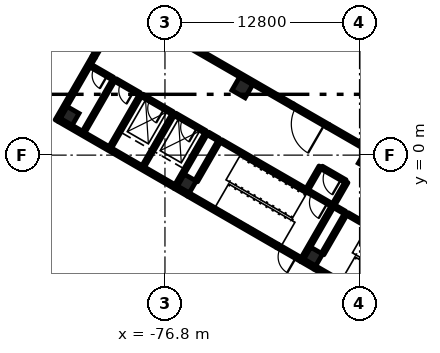
"""IFC4 building model, lengths in metres.
Left out: names, types, materials, properties, quantities, classifications, styles, units other than length and angle.
Written with IfcOpenShell. Run it as: python <this file> out.ifc"""

import sys

from ifc_helpers import new_model, si_unit, direction, frame, frame_2d, origin, origin_2d, place, context, subcontext, project, spatial, rectangle, extrude, element, fill, save


model = new_model("IFC4")
c1 = context("Model", 3, precision=1e-05, world=origin(), true_north=direction((0.0, 1.0)))
c2 = subcontext(c1, "Body", "Model", "MODEL_VIEW")
j1 = project(units=[si_unit("LENGTHUNIT", "METRE"), si_unit("PLANEANGLEUNIT", "RADIAN")], contexts=[c1])
p1 = place(None, origin())
s1 = spatial("IfcSite", under=j1, at=p1, CompositionType="ELEMENT")
p2 = place(p1, origin())
s2 = spatial("IfcBuilding", under=s1, at=p2, CompositionType="ELEMENT")
p3 = place(p2, origin())
s3 = spatial("IfcBuildingStorey", under=s2, at=p3, CompositionType="ELEMENT", Elevation=0.0)
for number, where, z_axis, x_axis in (
    (1, (-63.396, -0.349, -0.3), (0.0, 0.0, 1.0), (-0.5, -0.866, 0.0)),
    (2, (-71.71, 4.451, -0.3), (0.0, 0.0, 1.0), (-0.5, -0.866, 0.0)),
):
    element("IfcColumn", number, at=place(p3, frame(where, z_axis=z_axis, x_axis=x_axis)), inside=s3, PredefinedType="COLUMN", context=c2, shape_type="SweptSolid", body=[
        extrude(rectangle(XDim=1.0, YDim=1.0, at=origin_2d()), origin(), (0.0, 0.0, 1.0), 6.3),
    ])
for number, where, z_axis, x_axis in (
    (3, (-67.046, -6.671, -0.3), (0.0, 0.0, 1.0), (-0.5, -0.866, 0.0)),
    (4, (-75.36, -1.871, -0.3), (0.0, 0.0, 1.0), (-0.5, -0.866, 0.0)),
    (5, (-83.067, 2.579, -0.3), (0.0, 0.0, 1.0), (-0.5, -0.866, 0.0)),
):
    element("IfcColumn", number, at=place(p3, frame(where, z_axis=z_axis, x_axis=x_axis)), inside=s3, PredefinedType="COLUMN", context=c2, shape_type="SweptSolid", body=[
        extrude(rectangle(XDim=0.9, YDim=0.9, at=origin_2d()), origin(), (0.0, 0.0, 1.0), 6.3),
    ])
for number, where, z_axis, x_axis in (
    (6, (-73.919, 1.425, -1.5), (0.0, 0.0, 1.0), (-0.866, 0.5, 0.0)),
    (7, (-75.394, -1.129, -1.5), (0.0, 0.0, 1.0), (-0.866, 0.5, 0.0)),
):
    element("IfcWall", number, at=place(p3, frame(where, z_axis=z_axis, x_axis=x_axis)), inside=s3, PredefinedType="SOLIDWALL", context=c2, shape_type="SweptSolid", body=[
        extrude(rectangle(XDim=5.3, YDim=0.25, at=frame_2d((2.65, 0.0))), origin(), (0.0, 0.0, 1.0), 1.2),
    ])
p4 = place(p3, frame((-74.089, 1.379, -1.5), z_axis=(0.0, 0.0, 1.0), x_axis=(-0.499980770555, -0.866036505625, 0.0)))
e8 = element("IfcWall", 8, at=p4, inside=s3, PredefinedType="SOLIDWALL", context=c2, shape_type="SweptSolid", body=[
    extrude(rectangle(XDim=2.7, YDim=0.25, at=frame_2d((1.35, 0.0))), origin(), (0.0, 0.0, 1.0), 1.2),
])
p5 = place(p3, frame((-78.463, 3.905, -1.5), z_axis=(0.0, 0.0, 1.0), x_axis=(-0.4999416173, -0.866059108428, 0.0)))
e9 = element("IfcWall", 9, at=p5, inside=s3, PredefinedType="SOLIDWALL", context=c2, shape_type="SweptSolid", body=[
    extrude(rectangle(XDim=2.7, YDim=0.25, at=frame_2d((1.35, 0.0))), origin(), (0.0, 0.0, 1.0), 1.2),
])
p6 = place(p3, frame((-81.49, 6.461, 0.0), z_axis=(0.0, 0.0, 1.0), x_axis=(0.499998129301, 0.86602648383, 0.0)))
e10 = element("IfcWall", 10, at=p6, inside=s3, PredefinedType="SOLIDWALL", context=c2, shape_type="SweptSolid", body=[
    extrude(rectangle(XDim=2.3, YDim=0.25, at=frame_2d((1.15, 0.0))), origin(), (0.0, 0.0, 1.0), 5.7),
])
p7 = place(p6, frame((0.25, 0.0, 0.0)))
e11 = element("IfcOpeningElement", 11, at=p7, cuts=e10, PredefinedType="OPENING", context=c2, shape_type="SweptSolid", body=[
    extrude(rectangle(XDim=1.8, YDim=2.1, at=frame_2d((0.9, 1.05))), frame((0.0, 0.135, 0.0), z_axis=(0.0, -1.0, 0.0), x_axis=(1.0, 0.0, 0.0)), (0.0, 0.0, 1.0), 0.27),
])
p8 = place(p3, frame((-83.915, 2.26, 0.0), z_axis=(0.0, 0.0, 1.0), x_axis=(0.500010041276, 0.866019606374, 0.0)))
e12 = element("IfcWall", 12, at=p8, inside=s3, PredefinedType="SOLIDWALL", context=c2, shape_type="SweptSolid", body=[
    extrude(rectangle(XDim=4.85, YDim=0.25, at=frame_2d((2.425, 0.0))), origin(), (0.0, 0.0, 1.0), 5.7),
])
p9 = place(p3, frame((-61.098, -10.769, 0.0), z_axis=(0.0, 0.0, 1.0), x_axis=(-0.866026575979, 0.499997969693, 0.0)))
e13 = element("IfcWall", 13, at=p9, inside=s3, PredefinedType="SOLIDWALL", context=c2, shape_type="SweptSolid", body=[
    extrude(rectangle(XDim=6.75, YDim=0.25, at=frame_2d((3.375, 0.0))), origin(), (0.0, 0.0, 1.0), 5.7),
])
p10 = place(p3, frame((-67.81, -6.894, 0.0), z_axis=(0.0, 0.0, 1.0), x_axis=(-0.866033964044, 0.499985172903, 0.0)))
e14 = element("IfcWall", 14, at=p10, inside=s3, PredefinedType="SOLIDWALL", context=c2, shape_type="SweptSolid", body=[
    extrude(rectangle(XDim=1.85, YDim=0.25, at=frame_2d((0.925, 0.0))), origin(), (0.0, 0.0, 1.0), 5.7),
])
p11 = place(p10, frame((0.4, 0.0, 0.0)))
e15 = element("IfcOpeningElement", 15, at=p11, cuts=e14, PredefinedType="OPENING", context=c2, shape_type="SweptSolid", body=[
    extrude(rectangle(XDim=1.2, YDim=2.1, at=frame_2d((0.6, 1.05))), frame((0.0, 0.135, 0.0), z_axis=(0.0, -1.0, 0.0), x_axis=(1.0, 0.0, 0.0)), (0.0, 0.0, 1.0), 0.27),
])
p12 = place(p3, frame((-69.412, -5.969, 0.0), z_axis=(0.0, 0.0, 1.0), x_axis=(-0.866026575979, 0.499997969693, 0.0)))
e16 = element("IfcWall", 16, at=p12, inside=s3, PredefinedType="SOLIDWALL", context=c2, shape_type="SweptSolid", body=[
    extrude(rectangle(XDim=6.75, YDim=0.25, at=frame_2d((3.375, 0.0))), origin(), (0.0, 0.0, 1.0), 5.7),
])
p13 = place(p3, frame((-76.124, -2.094, 0.0), z_axis=(0.0, 0.0, 1.0), x_axis=(-0.866025267465, 0.500000236112, 0.0)))
e17 = element("IfcWall", 17, at=p13, inside=s3, PredefinedType="SOLIDWALL", context=c2, shape_type="SweptSolid", body=[
    extrude(rectangle(XDim=8.8, YDim=0.25, at=frame_2d((4.4, 0.0))), origin(), (0.0, 0.0, 1.0), 5.7),
])
for number, where, z_axis, x_axis in (
    (18, (-66.944, -7.394, 0.0), (0.0, 0.0, 1.0), (-0.866, 0.5, 0.0)),
    (19, (-75.258, -2.594, 0.0), (0.0, 0.0, 1.0), (-0.866, 0.5, 0.0)),
):
    element("IfcWall", number, at=place(p3, frame(where, z_axis=z_axis, x_axis=x_axis)), inside=s3, PredefinedType="SOLIDWALL", context=c2, shape_type="SweptSolid", body=[
        extrude(rectangle(XDim=1.0, YDim=0.25, at=frame_2d((0.5, 0.0))), origin(), (0.0, 0.0, 1.0), 5.7),
    ])
p14 = place(p3, frame((-64.881, -3.821, 0.0), z_axis=(0.0, 0.0, 1.0), x_axis=(-0.49999285859, -0.86602952684, 0.0)))
e20 = element("IfcWall", 20, at=p14, inside=s3, PredefinedType="SOLIDWALL", context=c2, shape_type="SweptSolid", body=[
    extrude(rectangle(XDim=3.1, YDim=0.2, at=frame_2d((1.55, 0.0))), origin(), (0.0, 0.0, 1.0), 5.7),
])
p15 = place(p3, frame((-65.747, -3.321, 0.0), z_axis=(0.0, 0.0, 1.0), x_axis=(-0.49999894854, -0.866026010844, 0.0)))
e21 = element("IfcWall", 21, at=p15, inside=s3, PredefinedType="SOLIDWALL", context=c2, shape_type="SweptSolid", body=[
    extrude(rectangle(XDim=4.0, YDim=0.2, at=frame_2d((2.0, 0.0))), origin(), (0.0, 0.0, 1.0), 5.7),
])
p16 = place(p3, frame((-73.195, 0.979, 0.0), z_axis=(0.0, 0.0, 1.0), x_axis=(-0.500026960575, -0.86600983753, 0.0)))
e22 = element("IfcWall", 22, at=p16, inside=s3, PredefinedType="SOLIDWALL", context=c2, shape_type="SweptSolid", body=[
    extrude(rectangle(XDim=3.1, YDim=0.2, at=frame_2d((1.55, 0.0))), origin(), (0.0, 0.0, 1.0), 5.7),
])
p17 = place(p3, frame((-59.035, -7.196, 0.0), z_axis=(0.0, 0.0, 1.0), x_axis=(-0.866027239912, 0.49999681972, 0.0)))
e23 = element("IfcWall", 23, at=p17, inside=s3, PredefinedType="SOLIDWALL", context=c2, shape_type="SweptSolid", body=[
    extrude(rectangle(XDim=6.65, YDim=0.2, at=frame_2d((3.325, 0.0))), origin(), (0.0, 0.0, 1.0), 5.7),
])
p18 = place(p3, frame((-65.834, -3.271, 0.0), z_axis=(0.0, 0.0, 1.0), x_axis=(-0.866036909293, 0.499980071345, 0.0)))
e24 = element("IfcWall", 24, at=p18, inside=s3, PredefinedType="SOLIDWALL", context=c2, shape_type="SweptSolid", body=[
    extrude(rectangle(XDim=1.75, YDim=0.2, at=frame_2d((0.875, 0.0))), origin(), (0.0, 0.0, 1.0), 5.7),
])
p19 = place(p18, frame((0.3, 0.0, 0.0)))
e25 = element("IfcOpeningElement", 25, at=p19, cuts=e24, PredefinedType="OPENING", context=c2, shape_type="SweptSolid", body=[
    extrude(rectangle(XDim=1.2, YDim=2.1, at=frame_2d((0.6, 1.05))), frame((0.0, 0.11, 0.0), z_axis=(0.0, -1.0, 0.0), x_axis=(1.0, 0.0, 0.0)), (0.0, 0.0, 1.0), 0.22),
])
p20 = place(p3, frame((-67.349, -2.396, 0.0), z_axis=(0.0, 0.0, 1.0), x_axis=(-0.86601134256, 0.500024353964, 0.0)))
e26 = element("IfcWall", 26, at=p20, inside=s3, PredefinedType="SOLIDWALL", context=c2, shape_type="SweptSolid", body=[
    extrude(rectangle(XDim=6.65, YDim=0.2, at=frame_2d((3.325, 0.0))), origin(), (0.0, 0.0, 1.0), 5.7),
])
for number, where, z_axis, x_axis in (
    (27, (-74.061, 1.479, 0.0), (0.0, 0.0, 1.0), (-0.5, -0.866, 0.0)),
    (28, (-76.226, 2.729, 0.0), (0.0, 0.0, 1.0), (-0.5, -0.866, 0.0)),
    (29, (-78.391, 3.979, 0.0), (0.0, 0.0, 1.0), (-0.5, -0.866, 0.0)),
):
    element("IfcWall", number, at=place(p3, frame(where, z_axis=z_axis, x_axis=x_axis)), inside=s3, PredefinedType="SOLIDWALL", context=c2, shape_type="SweptSolid", body=[
        extrude(rectangle(XDim=4.0, YDim=0.2, at=frame_2d((2.0, 0.0))), origin(), (0.0, 0.0, 1.0), 5.7),
    ])
p21 = place(p3, frame((-74.148, 1.529, 0.0), z_axis=(0.0, 0.0, 1.0), x_axis=(-0.865980515519, 0.500077740698, 0.0)))
e30 = element("IfcWall", 30, at=p21, inside=s3, PredefinedType="SOLIDWALL", context=c2, shape_type="SweptSolid", body=[
    extrude(rectangle(XDim=2.3, YDim=0.2, at=frame_2d((1.15, 0.0))), origin(), (0.0, 0.0, 1.0), 5.7),
])
p22 = place(p21, frame((0.6, 0.0, 0.0)))
e31 = element("IfcOpeningElement", 31, at=p22, cuts=e30, PredefinedType="OPENING", context=c2, shape_type="SweptSolid", body=[
    extrude(rectangle(XDim=1.1, YDim=2.1, at=frame_2d((0.55, 1.05))), frame((0.0, 0.11, 0.0), z_axis=(0.0, -1.0, 0.0), x_axis=(1.0, 0.0, 0.0)), (0.0, 0.0, 1.0), 0.22),
])
p23 = place(p3, frame((-76.313, 2.779, 0.0), z_axis=(0.0, 0.0, 1.0), x_axis=(-0.865980515519, 0.500077740698, 0.0)))
e32 = element("IfcWall", 32, at=p23, inside=s3, PredefinedType="SOLIDWALL", context=c2, shape_type="SweptSolid", body=[
    extrude(rectangle(XDim=2.3, YDim=0.2, at=frame_2d((1.15, 0.0))), origin(), (0.0, 0.0, 1.0), 5.7),
])
p24 = place(p23, frame((0.6, 0.0, 0.0)))
e33 = element("IfcOpeningElement", 33, at=p24, cuts=e32, PredefinedType="OPENING", context=c2, shape_type="SweptSolid", body=[
    extrude(rectangle(XDim=1.1, YDim=2.1, at=frame_2d((0.55, 1.05))), frame((0.0, 0.11, 0.0), z_axis=(0.0, -1.0, 0.0), x_axis=(1.0, 0.0, 0.0)), (0.0, 0.0, 1.0), 0.22),
])
for number, where, z_axis, x_axis in (
    (34, (-64.847, -1.763, 0.0), (0.0, 0.0, 1.0), (-0.5, -0.866, 0.0)),
    (35, (-66.579, -0.763, 0.0), (0.0, 0.0, 1.0), (-0.5, -0.866, 0.0)),
):
    element("IfcWall", number, at=place(p3, frame(where, z_axis=z_axis, x_axis=x_axis)), inside=s3, PredefinedType="PARTITIONING", context=c2, shape_type="SweptSolid", body=[
        extrude(rectangle(XDim=1.7, YDim=0.2, at=frame_2d((0.85, 0.0))), origin(), (0.0, 0.0, 1.0), 5.1),
    ])
p25 = place(p3, frame((-64.934, -1.713, 0.0), z_axis=(0.0, 0.0, 1.0), x_axis=(-0.866022985545, 0.500004188491, 0.0)))
e36 = element("IfcWall", 36, at=p25, inside=s3, PredefinedType="PARTITIONING", context=c2, shape_type="SweptSolid", body=[
    extrude(rectangle(XDim=1.8, YDim=0.2, at=frame_2d((0.9, 0.0))), origin(), (0.0, 0.0, 1.0), 5.1),
])
p26 = place(p25, frame((0.3, 0.0, 0.0)))
e37 = element("IfcOpeningElement", 37, at=p26, cuts=e36, PredefinedType="OPENING", context=c2, shape_type="SweptSolid", body=[
    extrude(rectangle(XDim=1.2, YDim=2.1, at=frame_2d((0.6, 1.05))), frame((0.0, 0.11, 0.0), z_axis=(0.0, -1.0, 0.0), x_axis=(1.0, 0.0, 0.0)), (0.0, 0.0, 1.0), 0.22),
])
p27 = place(p3, frame((-60.095, -1.533, 0.0), z_axis=(0.0, 0.0, 1.0), x_axis=(-0.866013532718, 0.500020560727, 0.0)))
e38 = element("IfcWall", 38, at=p27, inside=s3, PredefinedType="SOLIDWALL", context=c2, shape_type="SweptSolid", body=[
    extrude(rectangle(XDim=6.9, YDim=0.25, at=frame_2d((3.45, 0.0))), origin(), (0.0, 0.0, 1.0), 5.1),
])
p28 = place(p3, frame((-66.071, 1.917, 0.0), z_axis=(0.0, 0.0, 1.0), x_axis=(-0.866059108428, 0.4999416173, 0.0)))
e39 = element("IfcWall", 39, at=p28, inside=s3, PredefinedType="SOLIDWALL", context=c2, shape_type="SweptSolid", body=[
    extrude(rectangle(XDim=2.7, YDim=0.25, at=frame_2d((1.35, 0.0))), origin(), (0.0, 0.0, 1.0), 5.1),
])
p29 = place(p28, frame((0.25, 0.0, 0.0)))
e40 = element("IfcOpeningElement", 40, at=p29, cuts=e39, PredefinedType="OPENING", context=c2, shape_type="SweptSolid", body=[
    extrude(rectangle(XDim=2.2, YDim=2.1, at=frame_2d((1.1, 1.05))), frame((0.0, 0.135, 0.0), z_axis=(0.0, -1.0, 0.0), x_axis=(1.0, 0.0, 0.0)), (0.0, 0.0, 1.0), 0.27),
])
p30 = place(p3, frame((-68.409, 3.267, 0.0), z_axis=(0.0, 0.0, 1.0), x_axis=(-0.866017240552, 0.500014138866, 0.0)))
e41 = element("IfcWall", 41, at=p30, inside=s3, PredefinedType="SOLIDWALL", context=c2, shape_type="SweptSolid", body=[
    extrude(rectangle(XDim=12.8, YDim=0.25, at=frame_2d((6.4, 0.0))), origin(), (0.0, 0.0, 1.0), 5.1),
])
p31 = place(p3, frame((-80.145, 4.991, 0.0), z_axis=(0.0, 0.0, 1.0), x_axis=(-0.49999894854, -0.866026010844, 0.0)))
e42 = element("IfcWall", 42, at=p31, inside=s3, PredefinedType="PARTITIONING", context=c2, shape_type="SweptSolid", body=[
    extrude(rectangle(XDim=4.0, YDim=0.2, at=frame_2d((2.0, 0.0))), origin(), (0.0, 0.0, 1.0), 5.1),
])
p32 = place(p3, frame((-78.478, 4.029, 0.0), z_axis=(0.0, 0.0, 1.0), x_axis=(-0.865978377894, 0.500081442387, 0.0)))
e43 = element("IfcWall", 43, at=p32, inside=s3, PredefinedType="PARTITIONING", context=c2, shape_type="SweptSolid", body=[
    extrude(rectangle(XDim=1.825, YDim=0.2, at=frame_2d((0.913, 0.0))), origin(), (0.0, 0.0, 1.0), 5.1),
])
p33 = place(p32, frame((0.413, 0.0, 0.0)))
e44 = element("IfcOpeningElement", 44, at=p33, cuts=e43, PredefinedType="OPENING", context=c2, shape_type="SweptSolid", body=[
    extrude(rectangle(XDim=1.0, YDim=2.1, at=frame_2d((0.5, 1.05))), frame((0.0, 0.11, 0.0), z_axis=(0.0, -1.0, 0.0), x_axis=(1.0, 0.0, 0.0)), (0.0, 0.0, 1.0), 0.22),
])
p34 = place(p3, frame((-80.231, 5.041, 0.0), z_axis=(0.0, 0.0, 1.0), x_axis=(-0.865964676353, 0.500105168249, 0.0)))
e45 = element("IfcWall", 45, at=p34, inside=s3, PredefinedType="PARTITIONING", context=c2, shape_type="SweptSolid", body=[
    extrude(rectangle(XDim=1.675, YDim=0.2, at=frame_2d((0.837, 0.0))), origin(), (0.0, 0.0, 1.0), 5.1),
])
p35 = place(p34, frame((0.413, 0.0, 0.0)))
e46 = element("IfcOpeningElement", 46, at=p35, cuts=e45, PredefinedType="OPENING", context=c2, shape_type="SweptSolid", body=[
    extrude(rectangle(XDim=1.0, YDim=2.1, at=frame_2d((0.5, 1.05))), frame((0.0, 0.11, 0.0), z_axis=(0.0, -1.0, 0.0), x_axis=(1.0, 0.0, 0.0)), (0.0, 0.0, 1.0), 0.22),
])
p36 = place(p3, frame((-64.968, -3.771, 0.0), z_axis=(0.0, 0.0, 1.0), x_axis=(-0.865885638426, 0.500242002602, 0.0)))
e47 = element("IfcWall", 47, at=p36, inside=s3, PredefinedType="PARTITIONING", context=c2, shape_type="SweptSolid", body=[
    extrude(rectangle(XDim=0.8, YDim=0.2, at=frame_2d((0.4, 0.0))), origin(), (0.0, 0.0, 1.0), 5.1),
])
p37 = place(p3, frame((-73.281, 1.029, 0.0), z_axis=(0.0, 0.0, 1.0), x_axis=(-0.865961984968, 0.500109828528, 0.0)))
e48 = element("IfcWall", 48, at=p37, inside=s3, PredefinedType="PARTITIONING", context=c2, shape_type="SweptSolid", body=[
    extrude(rectangle(XDim=0.8, YDim=0.2, at=frame_2d((0.4, 0.0))), origin(), (0.0, 0.0, 1.0), 5.1),
])
p38 = place(p7, origin())
e49 = element("IfcDoor", 49, at=p38, inside=s3, OperationType="DOUBLE_DOOR_SINGLE_SWING", PredefinedType="DOOR", context=c2, shape_type="SweptSolid", body=[
    extrude(rectangle(XDim=1.8, YDim=2.1, at=frame_2d((0.9, 1.05))), frame((0.0, 0.025, 0.0), z_axis=(0.0, -1.0, 0.0), x_axis=(1.0, 0.0, 0.0)), (0.0, 0.0, 1.0), 0.05),
])
fill(e11, e49)
p39 = place(p11, origin())
e50 = element("IfcDoor", 50, at=p39, inside=s3, OperationType="SINGLE_SWING_LEFT", PredefinedType="DOOR", context=c2, shape_type="SweptSolid", body=[
    extrude(rectangle(XDim=1.2, YDim=2.1, at=frame_2d((0.6, 1.05))), frame((0.0, 0.025, 0.0), z_axis=(0.0, -1.0, 0.0), x_axis=(1.0, 0.0, 0.0)), (0.0, 0.0, 1.0), 0.05),
])
fill(e15, e50)
p40 = place(p19, origin())
e51 = element("IfcDoor", 51, at=p40, inside=s3, OperationType="SINGLE_SWING_LEFT", PredefinedType="DOOR", context=c2, shape_type="SweptSolid", body=[
    extrude(rectangle(XDim=1.2, YDim=2.1, at=frame_2d((0.6, 1.05))), frame((0.0, 0.025, 0.0), z_axis=(0.0, -1.0, 0.0), x_axis=(1.0, 0.0, 0.0)), (0.0, 0.0, 1.0), 0.05),
])
fill(e25, e51)
p41 = place(p22, origin())
e52 = element("IfcDoor", 52, at=p41, inside=s3, OperationType="DOUBLE_DOOR_SLIDING", PredefinedType="DOOR", context=c2, shape_type="SweptSolid", body=[
    extrude(rectangle(XDim=1.1, YDim=2.1, at=frame_2d((0.55, 1.05))), frame((0.0, 0.025, 0.0), z_axis=(0.0, -1.0, 0.0), x_axis=(1.0, 0.0, 0.0)), (0.0, 0.0, 1.0), 0.05),
])
fill(e31, e52)
p42 = place(p24, origin())
e53 = element("IfcDoor", 53, at=p42, inside=s3, OperationType="DOUBLE_DOOR_SLIDING", PredefinedType="DOOR", context=c2, shape_type="SweptSolid", body=[
    extrude(rectangle(XDim=1.1, YDim=2.1, at=frame_2d((0.55, 1.05))), frame((0.0, 0.025, 0.0), z_axis=(0.0, -1.0, 0.0), x_axis=(1.0, 0.0, 0.0)), (0.0, 0.0, 1.0), 0.05),
])
fill(e33, e53)
p43 = place(p26, origin())
e54 = element("IfcDoor", 54, at=p43, inside=s3, OperationType="SINGLE_SWING_LEFT", PredefinedType="DOOR", context=c2, shape_type="SweptSolid", body=[
    extrude(rectangle(XDim=1.2, YDim=2.1, at=frame_2d((0.6, 1.05))), frame((0.0, 0.025, 0.0), z_axis=(0.0, -1.0, 0.0), x_axis=(1.0, 0.0, 0.0)), (0.0, 0.0, 1.0), 0.05),
])
fill(e37, e54)
p44 = place(p29, origin())
e55 = element("IfcDoor", 55, at=p44, inside=s3, OperationType="DOUBLE_DOOR_SINGLE_SWING", PredefinedType="DOOR", context=c2, shape_type="SweptSolid", body=[
    extrude(rectangle(XDim=2.2, YDim=2.1, at=frame_2d((1.1, 1.05))), frame((0.0, 0.025, 0.0), z_axis=(0.0, -1.0, 0.0), x_axis=(1.0, 0.0, 0.0)), (0.0, 0.0, 1.0), 0.05),
])
fill(e40, e55)
p45 = place(p33, origin())
e56 = element("IfcDoor", 56, at=p45, inside=s3, OperationType="SINGLE_SWING_LEFT", PredefinedType="DOOR", context=c2, shape_type="SweptSolid", body=[
    extrude(rectangle(XDim=1.0, YDim=2.1, at=frame_2d((0.5, 1.05))), frame((0.0, 0.025, 0.0), z_axis=(0.0, -1.0, 0.0), x_axis=(1.0, 0.0, 0.0)), (0.0, 0.0, 1.0), 0.05),
])
fill(e44, e56)
p46 = place(p35, origin())
e57 = element("IfcDoor", 57, at=p46, inside=s3, OperationType="SINGLE_SWING_LEFT", PredefinedType="DOOR", context=c2, shape_type="SweptSolid", body=[
    extrude(rectangle(XDim=1.0, YDim=2.1, at=frame_2d((0.5, 1.05))), frame((0.0, 0.025, 0.0), z_axis=(0.0, -1.0, 0.0), x_axis=(1.0, 0.0, 0.0)), (0.0, 0.0, 1.0), 0.05),
])
fill(e46, e57)
save(model, sys.argv[1])
